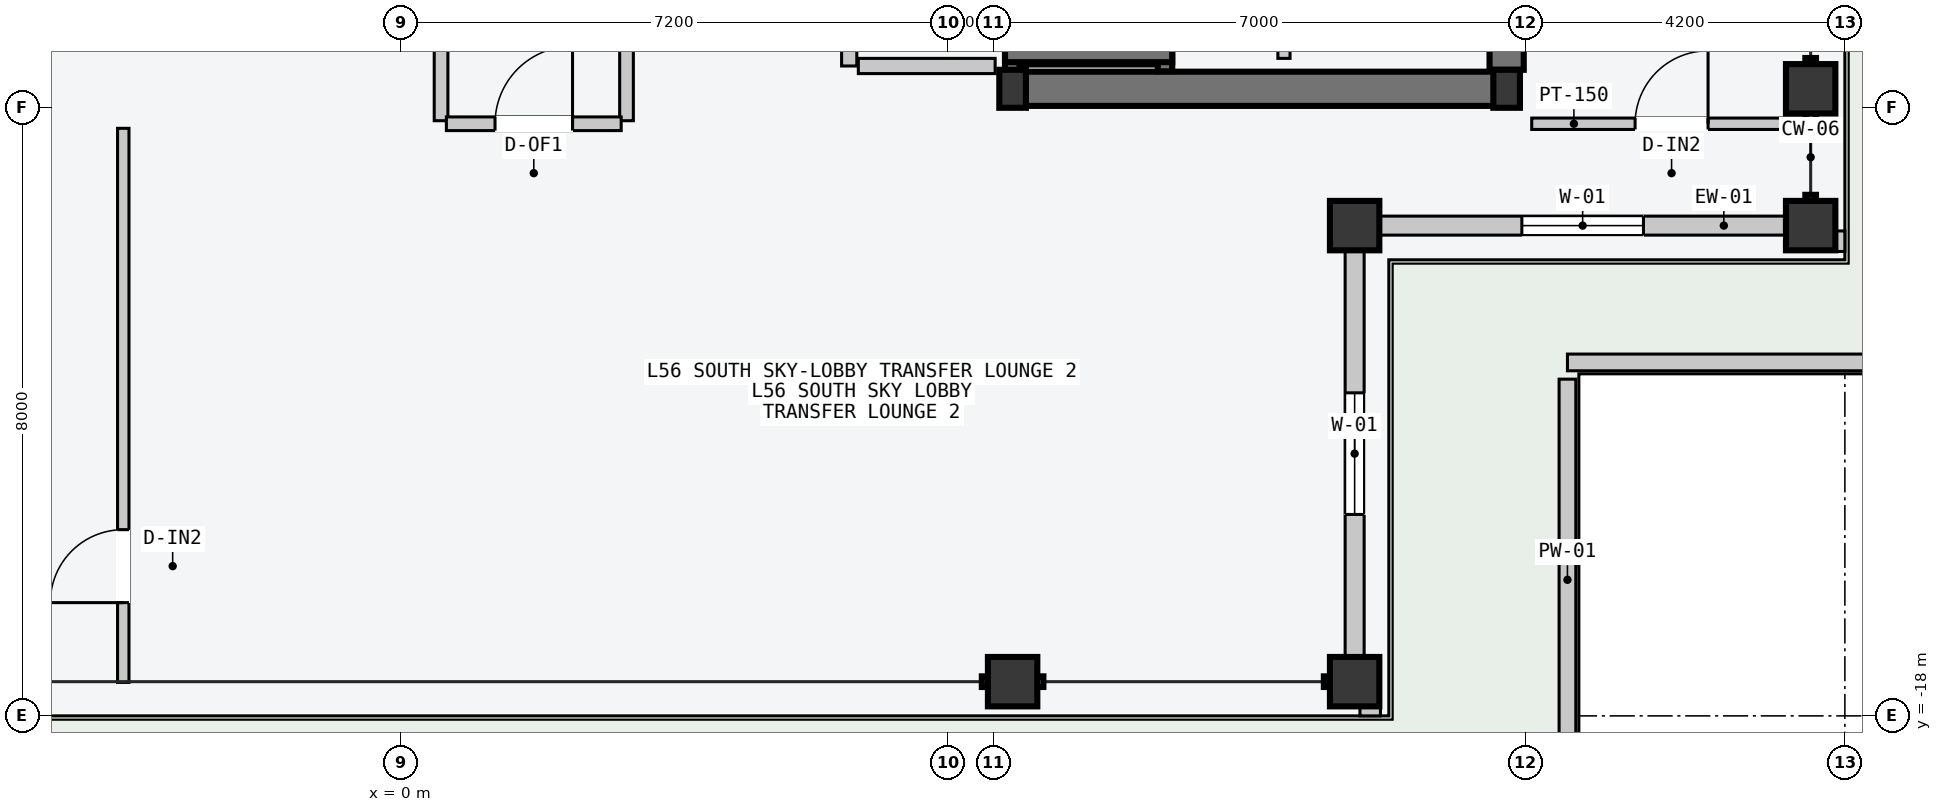
"""IFC4 building model, lengths in metres.
Left out: names, types, materials, properties, quantities, classifications, styles, units other than length and angle.
Written with IfcOpenShell. Run it as: python <this file> out.ifc"""

import sys

from ifc_helpers import new_model, si_unit, direction, frame, frame_2d, origin, origin_2d, place, context, subcontext, project, spatial, rectangle, hollow_rectangle, i_section, extrude, element, fill, save


model = new_model("IFC4")
c1 = context("Model", 3, precision=1e-05, world=origin(), true_north=direction((0.0, 1.0)))
c2 = subcontext(c1, "Body", "Model", "MODEL_VIEW")
j1 = project(units=[si_unit("LENGTHUNIT", "METRE"), si_unit("PLANEANGLEUNIT", "RADIAN")], contexts=[c1])
p1 = place(None, origin())
s1 = spatial("IfcSite", under=j1, at=p1, CompositionType="ELEMENT")
p2 = place(p1, origin())
s2 = spatial("IfcBuilding", under=s1, at=p2, CompositionType="ELEMENT")
p3 = place(p2, frame((0.0, 0.0, 213.9)))
s3 = spatial("IfcBuildingStorey", under=s2, at=p3, CompositionType="ELEMENT", Elevation=213.9)
p4 = place(p3, frame((8.07, -9.75, -0.2), z_axis=(0.0, 0.0, 1.0), x_axis=(1.0, 0.0, 0.0)))
e1 = element("IfcWall", 1, at=p4, inside=s3, PredefinedType="SHEAR", context=c2, shape_type="SweptSolid", body=[
    extrude(rectangle(XDim=6.46, YDim=0.45, at=frame_2d((3.23, 0.0))), origin(), (0.0, 0.0, 1.0), 4.5),
])
p5 = place(p3, frame((14.55, -9.5, -0.2), z_axis=(0.0, 0.0, 1.0), x_axis=(0.0, 1.0, 0.0)))
e2 = element("IfcWall", 2, at=p5, inside=s3, PredefinedType="SHEAR", context=c2, shape_type="SweptSolid", body=[
    extrude(rectangle(XDim=9.25, YDim=0.45, at=frame_2d((4.625, 0.0))), origin(), (0.0, 0.0, 1.0), 4.5),
])
for number, where, z_axis, x_axis in (
    (3, (8.05, -9.75, 0.0), (0.0, 0.0, 1.0), (1.0, 0.0, 0.0)),
    (4, (14.55, -9.75, 0.0), (0.0, 0.0, 1.0), (1.0, 0.0, 0.0)),
):
    element("IfcColumn", number, at=place(p3, frame(where, z_axis=z_axis, x_axis=x_axis)), inside=s3, PredefinedType="COLUMN", context=c2, shape_type="SweptSolid", body=[
        extrude(i_section(OverallWidth=0.35, OverallDepth=0.5, WebThickness=0.02, FlangeThickness=0.032, at=origin_2d()), origin(), (0.0, 0.0, 1.0), 4.5),
    ])
for number, where, z_axis, x_axis in (
    (5, (8.05, -17.55, -0.2), (0.0, 0.0, 1.0), (1.0, 0.0, 0.0)),
    (6, (12.55, -17.55, -0.2), (0.0, 0.0, 1.0), (1.0, 0.0, 0.0)),
    (7, (18.55, -11.55, -0.2), (0.0, 0.0, 1.0), (0.0, 1.0, 0.0)),
    (8, (18.55, -9.75, -0.2), (0.0, 0.0, 1.0), (0.0, 1.0, 0.0)),
    (9, (12.55, -11.55, -0.2), (0.0, 0.0, 1.0), (1.0, 0.0, 0.0)),
):
    element("IfcColumn", number, at=place(p3, frame(where, z_axis=z_axis, x_axis=x_axis)), inside=s3, PredefinedType="COLUMN", context=c2, shape_type="SweptSolid", body=[
        extrude(hollow_rectangle(XDim=0.65, YDim=0.65, WallThickness=0.028, at=origin_2d()), origin(), (0.0, 0.0, 1.0), 4.7),
    ])
p6 = place(p3, frame((12.885, -11.55, 0.0), z_axis=(0.0, 0.0, 1.0), x_axis=(1.0, 0.0, 0.0)))
e10 = element("IfcWall", 10, at=p6, inside=s3, PredefinedType="STANDARD", context=c2, shape_type="SweptSolid", body=[
    extrude(rectangle(XDim=5.33, YDim=0.25, at=frame_2d((2.665, 0.0))), origin(), (0.0, 0.0, 1.0), 3.75),
])
p7 = place(p6, frame((1.865, 0.0, 0.85)))
e11 = element("IfcOpeningElement", 11, at=p7, cuts=e10, PredefinedType="OPENING", context=c2, shape_type="SweptSolid", body=[
    extrude(rectangle(XDim=1.6, YDim=2.0, at=frame_2d((0.8, 1.0))), frame((0.0, 0.135, 0.0), z_axis=(0.0, -1.0, 0.0), x_axis=(1.0, 0.0, 0.0)), (0.0, 0.0, 1.0), 0.27),
])
p8 = place(p3, frame((12.55, -17.215, 0.0), z_axis=(0.0, 0.0, 1.0), x_axis=(0.0, 1.0, 0.0)))
e12 = element("IfcWall", 12, at=p8, inside=s3, PredefinedType="STANDARD", context=c2, shape_type="SweptSolid", body=[
    extrude(rectangle(XDim=5.33, YDim=0.25, at=frame_2d((2.665, 0.0))), origin(), (0.0, 0.0, 1.0), 3.75),
])
p9 = place(p8, frame((1.865, 0.0, 0.85)))
e13 = element("IfcOpeningElement", 13, at=p9, cuts=e12, PredefinedType="OPENING", context=c2, shape_type="SweptSolid", body=[
    extrude(rectangle(XDim=1.6, YDim=2.0, at=frame_2d((0.8, 1.0))), frame((0.0, 0.135, 0.0), z_axis=(0.0, -1.0, 0.0), x_axis=(1.0, 0.0, 0.0)), (0.0, 0.0, 1.0), 0.27),
])
for number, where, z_axis, x_axis in (
    (14, (12.62, -17.89, 0.0), (0.0, 0.0, 1.0), (1.0, 0.0, 0.0)),
    (15, (18.89, -11.89, 0.0), (0.0, 0.0, 1.0), (0.0, 1.0, 0.0)),
):
    element("IfcWall", number, at=place(p3, frame(where, z_axis=z_axis, x_axis=x_axis)), inside=s3, PredefinedType="PARAPET", context=c2, shape_type="SweptSolid", body=[
        extrude(rectangle(XDim=0.27, YDim=0.22, at=frame_2d((0.135, 0.0))), origin(), (0.0, 0.0, 1.0), 1.2),
    ])
p10 = place(p3, frame((15.35, -18.85, 0.0), z_axis=(0.0, 0.0, 1.0), x_axis=(0.0, 1.0, 0.0)))
e16 = element("IfcWall", 16, at=p10, inside=s3, PredefinedType="PARAPET", context=c2, shape_type="SweptSolid", body=[
    extrude(rectangle(XDim=5.28, YDim=0.22, at=frame_2d((2.64, 0.0))), origin(), (0.0, 0.0, 1.0), 1.2),
])
p11 = place(p3, frame((15.35, -13.35, 0.0), z_axis=(0.0, 0.0, 1.0), x_axis=(1.0, 0.0, 0.0)))
e17 = element("IfcWall", 17, at=p11, inside=s3, PredefinedType="PARAPET", context=c2, shape_type="SweptSolid", body=[
    extrude(rectangle(XDim=5.28, YDim=0.22, at=frame_2d((2.64, 0.0))), origin(), (0.0, 0.0, 1.0), 1.2),
])
p12 = place(p3, frame((8.045, -9.52, -0.2), z_axis=(0.0, 0.0, 1.0), x_axis=(0.0, 1.0, 0.0)))
e18 = element("IfcWall", 18, at=p12, inside=s3, PredefinedType="SOLIDWALL", context=c2, shape_type="SweptSolid", body=[
    extrude(rectangle(XDim=2.12, YDim=0.19, at=frame_2d((1.06, 0.0))), origin(), (0.0, 0.0, 1.0), 4.5),
])
p13 = place(p12, frame((0.57, 0.0, 0.2)))
e19 = element("IfcOpeningElement", 19, at=p13, cuts=e18, PredefinedType="OPENING", context=c2, shape_type="SweptSolid", body=[
    extrude(rectangle(XDim=1.1, YDim=2.2, at=frame_2d((0.55, 1.1))), frame((0.0, 0.105, 0.0), z_axis=(0.0, -1.0, 0.0), x_axis=(1.0, 0.0, 0.0)), (0.0, 0.0, 1.0), 0.21),
])
p14 = place(p3, frame((10.055, -9.52, -0.2), z_axis=(0.0, 0.0, 1.0), x_axis=(0.0, 1.0, 0.0)))
e20 = element("IfcWall", 20, at=p14, inside=s3, PredefinedType="SOLIDWALL", context=c2, shape_type="SweptSolid", body=[
    extrude(rectangle(XDim=2.12, YDim=0.19, at=frame_2d((1.06, 0.0))), origin(), (0.0, 0.0, 1.0), 4.5),
])
p15 = place(p3, frame((7.95, -9.305, -0.2), z_axis=(0.0, 0.0, 1.0), x_axis=(1.0, 0.0, 0.0)))
e21 = element("IfcWall", 21, at=p15, inside=s3, PredefinedType="SOLIDWALL", context=c2, shape_type="SweptSolid", body=[
    extrude(rectangle(XDim=2.2, YDim=0.19, at=frame_2d((1.1, 0.0))), origin(), (0.0, 0.0, 1.0), 4.5),
])
p16 = place(p3, frame((5.9, -9.45, 0.0), z_axis=(0.0, 0.0, 1.0), x_axis=(0.0, 1.0, 0.0)))
e22 = element("IfcWall", 22, at=p16, inside=s3, PredefinedType="PARTITIONING", context=c2, shape_type="SweptSolid", body=[
    extrude(rectangle(XDim=10.5, YDim=0.2, at=frame_2d((5.25, 0.0))), origin(), (0.0, 0.0, 1.0), 4.3),
])
p17 = place(p16, frame((3.9, 0.0, 0.0)))
e23 = element("IfcOpeningElement", 23, at=p17, cuts=e22, PredefinedType="OPENING", context=c2, shape_type="SweptSolid", body=[
    extrude(rectangle(XDim=1.5, YDim=2.2, at=frame_2d((0.75, 1.1))), frame((0.0, 0.11, 0.0), z_axis=(0.0, -1.0, 0.0), x_axis=(1.0, 0.0, 0.0)), (0.0, 0.0, 1.0), 0.22),
])
p18 = place(p3, frame((6.02, -9.45, 0.0), z_axis=(0.0, 0.0, 1.0), x_axis=(1.0, 0.0, 0.0)))
e24 = element("IfcWall", 24, at=p18, inside=s3, PredefinedType="PARTITIONING", context=c2, shape_type="SweptSolid", body=[
    extrude(rectangle(XDim=1.8, YDim=0.2, at=frame_2d((0.9, 0.0))), origin(), (0.0, 0.0, 1.0), 4.3),
])
p19 = place(p3, frame((11.62, -9.35, 0.0), z_axis=(0.0, 0.0, 1.0), x_axis=(0.0, 1.0, 0.0)))
e25 = element("IfcWall", 25, at=p19, inside=s3, PredefinedType="PARTITIONING", context=c2, shape_type="SweptSolid", body=[
    extrude(rectangle(XDim=3.85, YDim=0.16, at=frame_2d((1.925, 0.0))), origin(), (0.0, 0.0, 1.0), 4.3),
])
p20 = place(p19, frame((0.512, 0.0, 0.0)))
e26 = element("IfcOpeningElement", 26, at=p20, cuts=e25, PredefinedType="OPENING", context=c2, shape_type="SweptSolid", body=[
    extrude(rectangle(XDim=0.9, YDim=2.15, at=frame_2d((0.45, 1.075))), frame((0.0, 0.09, 0.0), z_axis=(0.0, -1.0, 0.0), x_axis=(1.0, 0.0, 0.0)), (0.0, 0.0, 1.0), 0.18),
])
p21 = place(p19, frame((2.438, 0.0, 0.0)))
e27 = element("IfcOpeningElement", 27, at=p21, cuts=e25, PredefinedType="OPENING", context=c2, shape_type="SweptSolid", body=[
    extrude(rectangle(XDim=0.9, YDim=2.15, at=frame_2d((0.45, 1.075))), frame((0.0, 0.09, 0.0), z_axis=(0.0, -1.0, 0.0), x_axis=(1.0, 0.0, 0.0)), (0.0, 0.0, 1.0), 0.18),
])
p22 = place(p3, frame((0.53, -10.17, 0.0), z_axis=(0.0, 0.0, 1.0), x_axis=(0.0, 1.0, 0.0)))
e28 = element("IfcWall", 28, at=p22, inside=s3, PredefinedType="PARTITIONING", context=c2, shape_type="SweptSolid", body=[
    extrude(rectangle(XDim=4.49, YDim=0.18, at=frame_2d((2.245, 0.0))), origin(), (0.0, 0.0, 1.0), 4.3),
])
p23 = place(p22, frame((1.15, 0.0, 0.0)))
e29 = element("IfcOpeningElement", 29, at=p23, cuts=e28, PredefinedType="OPENING", context=c2, shape_type="SweptSolid", body=[
    extrude(rectangle(XDim=0.96, YDim=2.18, at=frame_2d((0.48, 1.09))), frame((0.0, 0.1, 0.0), z_axis=(0.0, -1.0, 0.0), x_axis=(1.0, 0.0, 0.0)), (0.0, 0.0, 1.0), 0.2),
])
p24 = place(p3, frame((2.97, -10.17, 0.0), z_axis=(0.0, 0.0, 1.0), x_axis=(0.0, 1.0, 0.0)))
e30 = element("IfcWall", 30, at=p24, inside=s3, PredefinedType="PARTITIONING", context=c2, shape_type="SweptSolid", body=[
    extrude(rectangle(XDim=4.49, YDim=0.18, at=frame_2d((2.245, 0.0))), origin(), (0.0, 0.0, 1.0), 4.3),
])
p25 = place(p24, frame((1.15, 0.0, 0.0)))
e31 = element("IfcOpeningElement", 31, at=p25, cuts=e30, PredefinedType="OPENING", context=c2, shape_type="SweptSolid", body=[
    extrude(rectangle(XDim=0.96, YDim=2.18, at=frame_2d((0.48, 1.09))), frame((0.0, 0.1, 0.0), z_axis=(0.0, -1.0, 0.0), x_axis=(1.0, 0.0, 0.0)), (0.0, 0.0, 1.0), 0.2),
])
p26 = place(p3, frame((-3.651, -17.56, 0.0), z_axis=(0.0, 0.0, 1.0), x_axis=(0.0, 1.0, 0.0)))
e32 = element("IfcWall", 32, at=p26, inside=s3, PredefinedType="PARTITIONING", context=c2, shape_type="SweptSolid", body=[
    extrude(rectangle(XDim=7.29, YDim=0.15, at=frame_2d((3.645, 0.0))), origin(), (0.0, 0.0, 1.0), 4.3),
])
p27 = place(p26, frame((1.05, 0.0, 0.0)))
e33 = element("IfcOpeningElement", 33, at=p27, cuts=e32, PredefinedType="OPENING", context=c2, shape_type="SweptSolid", body=[
    extrude(rectangle(XDim=0.96, YDim=2.18, at=frame_2d((0.48, 1.09))), frame((0.0, 0.085, 0.0), z_axis=(0.0, -1.0, 0.0), x_axis=(1.0, 0.0, 0.0)), (0.0, 0.0, 1.0), 0.17),
])
p28 = place(p3, frame((0.6, -10.21, 0.0), z_axis=(0.0, 0.0, 1.0), x_axis=(1.0, 0.0, 0.0)))
e34 = element("IfcWall", 34, at=p28, inside=s3, PredefinedType="PARTITIONING", context=c2, shape_type="SweptSolid", body=[
    extrude(rectangle(XDim=2.3, YDim=0.18, at=frame_2d((1.15, 0.0))), origin(), (0.0, 0.0, 1.0), 4.3),
])
p29 = place(p28, frame((0.64, 0.0, 0.0)))
e35 = element("IfcOpeningElement", 35, at=p29, cuts=e34, PredefinedType="OPENING", context=c2, shape_type="SweptSolid", body=[
    extrude(rectangle(XDim=1.02, YDim=2.2, at=frame_2d((0.51, 1.1))), frame((0.0, 0.1, 0.0), z_axis=(0.0, -1.0, 0.0), x_axis=(1.0, 0.0, 0.0)), (0.0, 0.0, 1.0), 0.2),
])
p30 = place(p3, frame((14.88, -10.21, 0.0), z_axis=(0.0, 0.0, 1.0), x_axis=(1.0, 0.0, 0.0)))
e36 = element("IfcWall", 36, at=p30, inside=s3, PredefinedType="PARTITIONING", context=c2, shape_type="SweptSolid", body=[
    extrude(rectangle(XDim=3.68, YDim=0.15, at=frame_2d((1.84, 0.0))), origin(), (0.0, 0.0, 1.0), 4.3),
])
p31 = place(p30, frame((1.36, 0.0, 0.0)))
e37 = element("IfcOpeningElement", 37, at=p31, cuts=e36, PredefinedType="OPENING", context=c2, shape_type="SweptSolid", body=[
    extrude(rectangle(XDim=0.96, YDim=2.18, at=frame_2d((0.48, 1.09))), frame((0.0, 0.085, 0.0), z_axis=(0.0, -1.0, 0.0), x_axis=(1.0, 0.0, 0.0)), (0.0, 0.0, 1.0), 0.17),
])
p32 = place(p7, origin())
e38 = element("IfcWindow", 38, at=p32, inside=s3, PartitioningType="SINGLE_PANEL", PredefinedType="WINDOW", context=c2, shape_type="SweptSolid", body=[
    extrude(rectangle(XDim=1.6, YDim=2.0, at=frame_2d((0.8, 1.0))), frame((0.0, 0.03, 0.0), z_axis=(0.0, -1.0, 0.0), x_axis=(1.0, 0.0, 0.0)), (0.0, 0.0, 1.0), 0.06),
])
fill(e11, e38)
p33 = place(p9, origin())
e39 = element("IfcWindow", 39, at=p33, inside=s3, PartitioningType="SINGLE_PANEL", PredefinedType="WINDOW", context=c2, shape_type="SweptSolid", body=[
    extrude(rectangle(XDim=1.6, YDim=2.0, at=frame_2d((0.8, 1.0))), frame((0.0, 0.03, 0.0), z_axis=(0.0, -1.0, 0.0), x_axis=(1.0, 0.0, 0.0)), (0.0, 0.0, 1.0), 0.06),
])
fill(e13, e39)
p34 = place(p27, origin())
e40 = element("IfcDoor", 40, at=p34, inside=s3, OperationType="SINGLE_SWING_LEFT", PredefinedType="DOOR", context=c2, shape_type="SweptSolid", body=[
    extrude(rectangle(XDim=0.96, YDim=2.18, at=frame_2d((0.48, 1.09))), frame((0.0, 0.025, 0.0), z_axis=(0.0, -1.0, 0.0), x_axis=(1.0, 0.0, 0.0)), (0.0, 0.0, 1.0), 0.05),
])
fill(e33, e40)
p35 = place(p29, origin())
e41 = element("IfcDoor", 41, at=p35, inside=s3, OperationType="SINGLE_SWING_RIGHT", PredefinedType="DOOR", context=c2, shape_type="SweptSolid", body=[
    extrude(rectangle(XDim=1.02, YDim=2.2, at=frame_2d((0.51, 1.1))), frame((0.0, 0.025, 0.0), z_axis=(0.0, -1.0, 0.0), x_axis=(1.0, 0.0, 0.0)), (0.0, 0.0, 1.0), 0.05),
])
fill(e35, e41)
p36 = place(p31, origin())
e42 = element("IfcDoor", 42, at=p36, inside=s3, OperationType="SINGLE_SWING_RIGHT", PredefinedType="DOOR", context=c2, shape_type="SweptSolid", body=[
    extrude(rectangle(XDim=0.96, YDim=2.18, at=frame_2d((0.48, 1.09))), frame((0.0, 0.025, 0.0), z_axis=(0.0, -1.0, 0.0), x_axis=(1.0, 0.0, 0.0)), (0.0, 0.0, 1.0), 0.05),
])
fill(e37, e42)
save(model, sys.argv[1])
